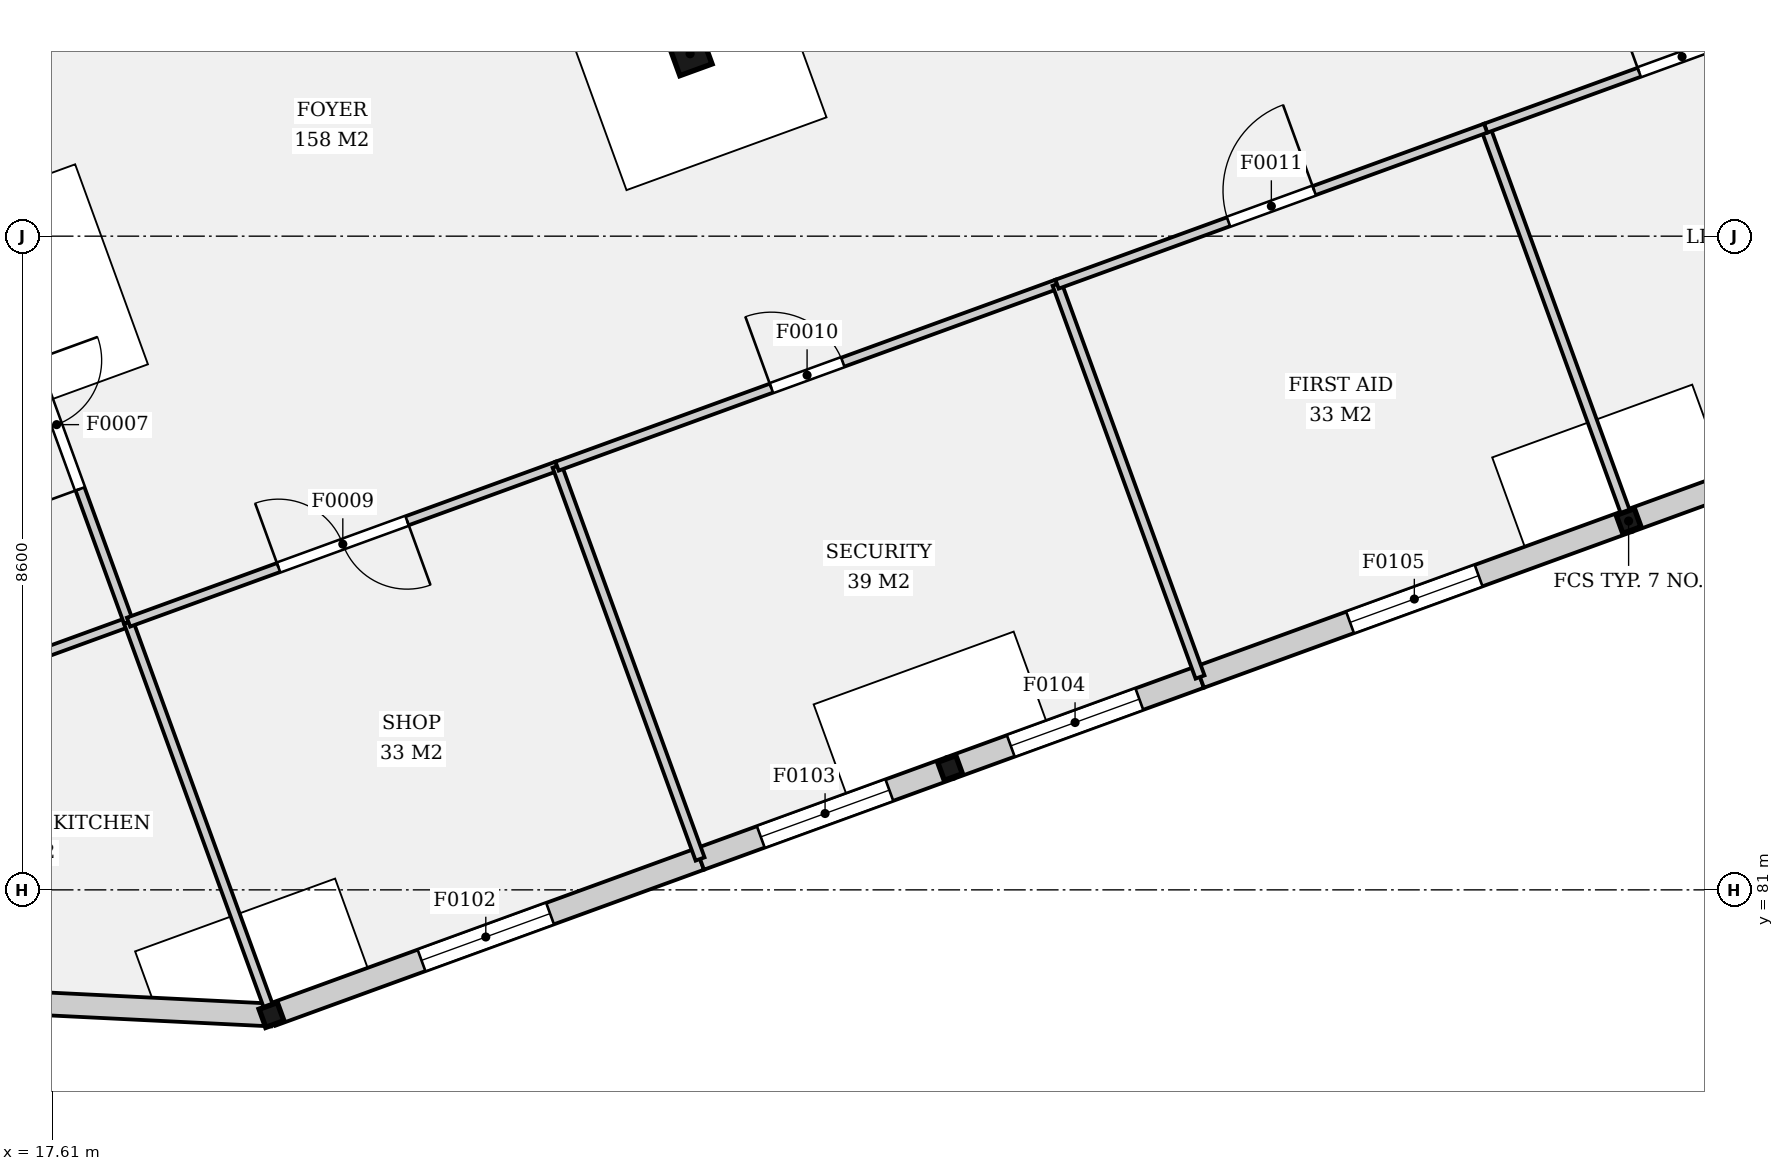
"""IFC4 building model, lengths in metres.
Left out: names, types, materials, properties, quantities, classifications, styles, units other than length and angle.
Written with IfcOpenShell. Run it as: python <this file> out.ifc"""

import sys

from ifc_helpers import new_model, si_unit, direction, frame, frame_2d, origin, origin_2d, place, context, subcontext, project, spatial, rectangle, hollow_rectangle, extrude, element, fill, save


model = new_model("IFC4")
c1 = context("Model", 3, precision=1e-05, world=origin(), true_north=direction((0.0, 1.0)))
c2 = subcontext(c1, "Body", "Model", "MODEL_VIEW")
j1 = project(units=[si_unit("LENGTHUNIT", "METRE"), si_unit("PLANEANGLEUNIT", "RADIAN")], contexts=[c1])
p1 = place(None, origin())
s1 = spatial("IfcSite", under=j1, at=p1, CompositionType="ELEMENT")
p2 = place(p1, origin())
s2 = spatial("IfcBuilding", under=s1, at=p2, CompositionType="ELEMENT")
p3 = place(p2, origin())
s3 = spatial("IfcBuildingStorey", under=s2, at=p3, CompositionType="ELEMENT", Elevation=0.0)
for number, where, z_axis, x_axis in (
    (1, (20.493, 79.354, 0.0), (0.0, 0.0, 1.0), (0.94, 0.342, 0.0)),
    (2, (29.42, 82.603, 0.0), (0.0, 0.0, 1.0), (0.94, 0.342, 0.0)),
    (3, (38.347, 85.852, 0.0), (0.0, 0.0, 1.0), (0.94, 0.342, 0.0)),
):
    element("IfcColumn", number, at=place(p3, frame(where, z_axis=z_axis, x_axis=x_axis)), inside=s3, PredefinedType="COLUMN", context=c2, shape_type="SweptSolid", body=[
        extrude(hollow_rectangle(XDim=0.254, YDim=0.254, WallThickness=0.012, at=origin_2d()), origin(), (0.0, 0.0, 1.0), 5.0),
    ])
p4 = place(p3, frame((26.0, 92.0, 0.0), z_axis=(0.0, 0.0, 1.0), x_axis=(0.939692620786, 0.342020143326, 0.0)))
e4 = element("IfcColumn", 4, at=p4, inside=s3, PredefinedType="COLUMN", context=c2, shape_type="SweptSolid", body=[
    extrude(rectangle(XDim=0.45, YDim=0.45, at=origin_2d()), origin(), (0.0, 0.0, 1.0), 5.0),
])
p5 = place(p3, frame((10.198, 79.864, 0.0), z_axis=(0.0, 0.0, 1.0), x_axis=(0.998777549242, -0.049430831779, 0.0)))
e5 = element("IfcWall", 5, at=p5, inside=s3, PredefinedType="ELEMENTEDWALL", context=c2, shape_type="SweptSolid", body=[
    extrude(rectangle(XDim=10.308, YDim=0.3, at=frame_2d((5.154, 0.0))), origin(), (0.0, 0.0, 1.0), 4.303),
])
p6 = place(p5, frame((4.254, 0.0, 0.9)))
e6 = element("IfcOpeningElement", 6, at=p6, cuts=e5, PredefinedType="OPENING", context=c2, shape_type="SweptSolid", body=[
    extrude(rectangle(XDim=1.8, YDim=2.4, at=frame_2d((0.9, 1.2))), frame((0.0, 0.16, 0.0), z_axis=(0.0, -1.0, 0.0), x_axis=(1.0, 0.0, 0.0)), (0.0, 0.0, 1.0), 0.32),
])
p7 = place(p3, frame((20.493, 79.354, 0.0), z_axis=(0.0, 0.0, 1.0), x_axis=(0.939699533273, 0.342001150825, 0.0)))
e7 = element("IfcWall", 7, at=p7, inside=s3, PredefinedType="ELEMENTEDWALL", context=c2, shape_type="SweptSolid", body=[
    extrude(rectangle(XDim=6.0, YDim=0.3, at=frame_2d((3.0, 0.0))), origin(), (0.0, 0.0, 1.0), 4.303),
])
p8 = place(p7, frame((2.1, 0.0, 0.9)))
e8 = element("IfcOpeningElement", 8, at=p8, cuts=e7, PredefinedType="OPENING", context=c2, shape_type="SweptSolid", body=[
    extrude(rectangle(XDim=1.8, YDim=2.4, at=frame_2d((0.9, 1.2))), frame((0.0, 0.16, 0.0), z_axis=(0.0, -1.0, 0.0), x_axis=(1.0, 0.0, 0.0)), (0.0, 0.0, 1.0), 0.32),
])
p9 = place(p3, frame((26.131, 81.406, 0.0), z_axis=(0.0, 0.0, 1.0), x_axis=(0.939693585395, 0.342017493073, 0.0)))
e9 = element("IfcWall", 9, at=p9, inside=s3, PredefinedType="ELEMENTEDWALL", context=c2, shape_type="SweptSolid", body=[
    extrude(rectangle(XDim=3.5, YDim=0.3, at=frame_2d((1.75, 0.0))), origin(), (0.0, 0.0, 1.0), 4.303),
])
p10 = place(p9, frame((0.85, 0.0, 0.9)))
e10 = element("IfcOpeningElement", 10, at=p10, cuts=e9, PredefinedType="OPENING", context=c2, shape_type="SweptSolid", body=[
    extrude(rectangle(XDim=1.8, YDim=2.4, at=frame_2d((0.9, 1.2))), frame((0.0, 0.16, 0.0), z_axis=(0.0, -1.0, 0.0), x_axis=(1.0, 0.0, 0.0)), (0.0, 0.0, 1.0), 0.32),
])
p11 = place(p3, frame((29.42, 82.603, 0.0), z_axis=(0.0, 0.0, 1.0), x_axis=(0.939693585395, 0.342017493073, 0.0)))
e11 = element("IfcWall", 11, at=p11, inside=s3, PredefinedType="ELEMENTEDWALL", context=c2, shape_type="SweptSolid", body=[
    extrude(rectangle(XDim=3.5, YDim=0.3, at=frame_2d((1.75, 0.0))), origin(), (0.0, 0.0, 1.0), 4.303),
])
p12 = place(p11, frame((0.85, 0.0, 0.9)))
e12 = element("IfcOpeningElement", 12, at=p12, cuts=e11, PredefinedType="OPENING", context=c2, shape_type="SweptSolid", body=[
    extrude(rectangle(XDim=1.8, YDim=2.4, at=frame_2d((0.9, 1.2))), frame((0.0, 0.16, 0.0), z_axis=(0.0, -1.0, 0.0), x_axis=(1.0, 0.0, 0.0)), (0.0, 0.0, 1.0), 0.32),
])
p13 = place(p3, frame((32.709, 83.8, 0.0), z_axis=(0.0, 0.0, 1.0), x_axis=(0.939691215801, 0.342024003465, 0.0)))
e13 = element("IfcWall", 13, at=p13, inside=s3, PredefinedType="ELEMENTEDWALL", context=c2, shape_type="SweptSolid", body=[
    extrude(rectangle(XDim=6.0, YDim=0.3, at=frame_2d((3.0, 0.0))), origin(), (0.0, 0.0, 1.0), 4.303),
])
p14 = place(p13, frame((2.1, 0.0, 0.9)))
e14 = element("IfcOpeningElement", 14, at=p14, cuts=e13, PredefinedType="OPENING", context=c2, shape_type="SweptSolid", body=[
    extrude(rectangle(XDim=1.8, YDim=2.4, at=frame_2d((0.9, 1.2))), frame((0.0, 0.16, 0.0), z_axis=(0.0, -1.0, 0.0), x_axis=(1.0, 0.0, 0.0)), (0.0, 0.0, 1.0), 0.32),
])
p15 = place(p3, frame((38.347, 85.852, 0.0), z_axis=(0.0, 0.0, 1.0), x_axis=(0.939690992795, 0.34202461616, 0.0)))
e15 = element("IfcWall", 15, at=p15, inside=s3, PredefinedType="ELEMENTEDWALL", context=c2, shape_type="SweptSolid", body=[
    extrude(rectangle(XDim=5.5, YDim=0.3, at=frame_2d((2.75, 0.0))), origin(), (0.0, 0.0, 1.0), 4.303),
])
p16 = place(p15, frame((1.85, 0.0, 0.0)))
e16 = element("IfcOpeningElement", 16, at=p16, cuts=e15, PredefinedType="OPENING", context=c2, shape_type="SweptSolid", body=[
    extrude(rectangle(XDim=1.8, YDim=2.1, at=frame_2d((0.9, 1.05))), frame((0.0, 0.16, 0.0), z_axis=(0.0, -1.0, 0.0), x_axis=(1.0, 0.0, 0.0)), (0.0, 0.0, 1.0), 0.32),
])
p17 = place(p3, frame((38.347, 85.852, 0.0), z_axis=(0.0, 0.0, 1.0), x_axis=(-0.34202461616, 0.939690992795, 0.0)))
e17 = element("IfcWall", 17, at=p17, inside=s3, PredefinedType="PARTITIONING", context=c2, shape_type="SweptSolid", body=[
    extrude(rectangle(XDim=5.5, YDim=0.125, at=frame_2d((2.75, 0.0))), origin(), (0.0, 0.0, 1.0), 4.187),
])
p18 = place(p3, frame((36.466, 91.021, 0.0), z_axis=(0.0, 0.0, 1.0), x_axis=(0.939690992795, 0.34202461616, 0.0)))
e18 = element("IfcWall", 18, at=p18, inside=s3, PredefinedType="PARTITIONING", context=c2, shape_type="SweptSolid", body=[
    extrude(rectangle(XDim=5.5, YDim=0.125, at=frame_2d((2.75, 0.0))), origin(), (0.0, 0.0, 1.0), 4.187),
])
p19 = place(p18, frame((2.15, 0.0, 0.0)))
e19 = element("IfcOpeningElement", 19, at=p19, cuts=e18, PredefinedType="OPENING", context=c2, shape_type="SweptSolid", body=[
    extrude(rectangle(XDim=1.2, YDim=2.1, at=frame_2d((0.6, 1.05))), frame((0.0, 0.073, 0.0), z_axis=(0.0, -1.0, 0.0), x_axis=(1.0, 0.0, 0.0)), (0.0, 0.0, 1.0), 0.145),
])
p20 = place(p3, frame((9.685, 81.273, 0.0), z_axis=(0.0, 0.0, 1.0), x_axis=(0.939692088769, 0.342021605027, 0.0)))
e20 = element("IfcWall", 20, at=p20, inside=s3, PredefinedType="PARTITIONING", context=c2, shape_type="SweptSolid", body=[
    extrude(rectangle(XDim=9.5, YDim=0.125, at=frame_2d((4.75, 0.0))), origin(), (0.0, 0.0, 1.0), 4.187),
])
p21 = place(p20, frame((4.3, 0.0, 0.0)))
e21 = element("IfcOpeningElement", 21, at=p21, cuts=e20, PredefinedType="OPENING", context=c2, shape_type="SweptSolid", body=[
    extrude(rectangle(XDim=0.9, YDim=2.1, at=frame_2d((0.45, 1.05))), frame((0.0, 0.073, 0.0), z_axis=(0.0, -1.0, 0.0), x_axis=(1.0, 0.0, 0.0)), (0.0, 0.0, 1.0), 0.145),
])
p22 = place(p3, frame((20.493, 79.354, 0.0), z_axis=(0.0, 0.0, 1.0), x_axis=(-0.34202461616, 0.939690992795, 0.0)))
e22 = element("IfcWall", 22, at=p22, inside=s3, PredefinedType="PARTITIONING", context=c2, shape_type="SweptSolid", body=[
    extrude(rectangle(XDim=5.5, YDim=0.125, at=frame_2d((2.75, 0.0))), origin(), (0.0, 0.0, 1.0), 4.187),
])
p23 = place(p3, frame((18.612, 84.522, 0.0), z_axis=(0.0, 0.0, 1.0), x_axis=(-0.342013514495, 0.939695033456, 0.0)))
e23 = element("IfcWall", 23, at=p23, inside=s3, PredefinedType="PARTITIONING", context=c2, shape_type="SweptSolid", body=[
    extrude(rectangle(XDim=7.9, YDim=0.125, at=frame_2d((3.95, 0.0))), origin(), (0.0, 0.0, 1.0), 4.187),
])
p24 = place(p23, frame((1.865, 0.0, 0.0)))
e24 = element("IfcOpeningElement", 24, at=p24, cuts=e23, PredefinedType="OPENING", context=c2, shape_type="SweptSolid", body=[
    extrude(rectangle(XDim=1.8, YDim=2.1, at=frame_2d((0.9, 1.05))), frame((0.0, 0.073, 0.0), z_axis=(0.0, -1.0, 0.0), x_axis=(1.0, 0.0, 0.0)), (0.0, 0.0, 1.0), 0.145),
])
p25 = place(p3, frame((18.612, 84.522, 0.0), z_axis=(0.0, 0.0, 1.0), x_axis=(0.939699533273, 0.342001150825, 0.0)))
e25 = element("IfcWall", 25, at=p25, inside=s3, PredefinedType="PARTITIONING", context=c2, shape_type="SweptSolid", body=[
    extrude(rectangle(XDim=6.0, YDim=0.125, at=frame_2d((3.0, 0.0))), origin(), (0.0, 0.0, 1.0), 4.187),
])
p26 = place(p25, frame((2.1, 0.0, 0.0)))
e26 = element("IfcOpeningElement", 26, at=p26, cuts=e25, PredefinedType="OPENING", context=c2, shape_type="SweptSolid", body=[
    extrude(rectangle(XDim=1.8, YDim=2.1, at=frame_2d((0.9, 1.05))), frame((0.0, 0.073, 0.0), z_axis=(0.0, -1.0, 0.0), x_axis=(1.0, 0.0, 0.0)), (0.0, 0.0, 1.0), 0.145),
])
p27 = place(p3, frame((26.131, 81.406, 0.0), z_axis=(0.0, 0.0, 1.0), x_axis=(-0.34202461616, 0.939690992795, 0.0)))
e27 = element("IfcWall", 27, at=p27, inside=s3, PredefinedType="PARTITIONING", context=c2, shape_type="SweptSolid", body=[
    extrude(rectangle(XDim=5.5, YDim=0.125, at=frame_2d((2.75, 0.0))), origin(), (0.0, 0.0, 1.0), 4.303),
])
p28 = place(p3, frame((24.25, 86.574, 0.0), z_axis=(0.0, 0.0, 1.0), x_axis=(0.939682375401, 0.342048290979, 0.0)))
e28 = element("IfcWall", 28, at=p28, inside=s3, PredefinedType="PARTITIONING", context=c2, shape_type="SweptSolid", body=[
    extrude(rectangle(XDim=7.0, YDim=0.125, at=frame_2d((3.5, 0.0))), origin(), (0.0, 0.0, 1.0), 4.187),
])
p29 = place(p28, frame((3.0, 0.0, 0.0)))
e29 = element("IfcOpeningElement", 29, at=p29, cuts=e28, PredefinedType="OPENING", context=c2, shape_type="SweptSolid", body=[
    extrude(rectangle(XDim=1.0, YDim=2.1, at=frame_2d((0.5, 1.05))), frame((0.0, 0.073, 0.0), z_axis=(0.0, -1.0, 0.0), x_axis=(1.0, 0.0, 0.0)), (0.0, 0.0, 1.0), 0.145),
])
p30 = place(p3, frame((32.709, 83.8, 0.0), z_axis=(0.0, 0.0, 1.0), x_axis=(-0.342010349897, 0.939696185245, 0.0)))
e30 = element("IfcWall", 30, at=p30, inside=s3, PredefinedType="PARTITIONING", context=c2, shape_type="SweptSolid", body=[
    extrude(rectangle(XDim=5.5, YDim=0.125, at=frame_2d((2.75, 0.0))), origin(), (0.0, 0.0, 1.0), 4.303),
])
p31 = place(p3, frame((30.828, 88.969, 0.0), z_axis=(0.0, 0.0, 1.0), x_axis=(0.939704292321, 0.341988074343, 0.0)))
e31 = element("IfcWall", 31, at=p31, inside=s3, PredefinedType="PARTITIONING", context=c2, shape_type="SweptSolid", body=[
    extrude(rectangle(XDim=6.0, YDim=0.125, at=frame_2d((3.0, 0.0))), origin(), (0.0, 0.0, 1.0), 4.187),
])
p32 = place(p31, frame((2.4, 0.0, 0.0)))
e32 = element("IfcOpeningElement", 32, at=p32, cuts=e31, PredefinedType="OPENING", context=c2, shape_type="SweptSolid", body=[
    extrude(rectangle(XDim=1.2, YDim=2.1, at=frame_2d((0.6, 1.05))), frame((0.0, 0.073, 0.0), z_axis=(0.0, -1.0, 0.0), x_axis=(1.0, 0.0, 0.0)), (0.0, 0.0, 1.0), 0.145),
])
p33 = place(p8, origin())
e33 = element("IfcWindow", 33, at=p33, inside=s3, PartitioningType="SINGLE_PANEL", PredefinedType="WINDOW", context=c2, shape_type="SweptSolid", body=[
    extrude(rectangle(XDim=1.8, YDim=2.4, at=frame_2d((0.9, 1.2))), frame((0.0, 0.03, 0.0), z_axis=(0.0, -1.0, 0.0), x_axis=(1.0, 0.0, 0.0)), (0.0, 0.0, 1.0), 0.06),
])
fill(e8, e33)
p34 = place(p10, origin())
e34 = element("IfcWindow", 34, at=p34, inside=s3, PartitioningType="SINGLE_PANEL", PredefinedType="WINDOW", context=c2, shape_type="SweptSolid", body=[
    extrude(rectangle(XDim=1.8, YDim=2.4, at=frame_2d((0.9, 1.2))), frame((0.0, 0.03, 0.0), z_axis=(0.0, -1.0, 0.0), x_axis=(1.0, 0.0, 0.0)), (0.0, 0.0, 1.0), 0.06),
])
fill(e10, e34)
p35 = place(p12, origin())
e35 = element("IfcWindow", 35, at=p35, inside=s3, PartitioningType="SINGLE_PANEL", PredefinedType="WINDOW", context=c2, shape_type="SweptSolid", body=[
    extrude(rectangle(XDim=1.8, YDim=2.4, at=frame_2d((0.9, 1.2))), frame((0.0, 0.03, 0.0), z_axis=(0.0, -1.0, 0.0), x_axis=(1.0, 0.0, 0.0)), (0.0, 0.0, 1.0), 0.06),
])
fill(e12, e35)
p36 = place(p14, origin())
e36 = element("IfcWindow", 36, at=p36, inside=s3, PartitioningType="SINGLE_PANEL", PredefinedType="WINDOW", context=c2, shape_type="SweptSolid", body=[
    extrude(rectangle(XDim=1.8, YDim=2.4, at=frame_2d((0.9, 1.2))), frame((0.0, 0.03, 0.0), z_axis=(0.0, -1.0, 0.0), x_axis=(1.0, 0.0, 0.0)), (0.0, 0.0, 1.0), 0.06),
])
fill(e14, e36)
p37 = place(p24, origin())
e37 = element("IfcDoor", 37, at=p37, inside=s3, OperationType="DOUBLE_DOOR_SINGLE_SWING", PredefinedType="DOOR", context=c2, shape_type="SweptSolid", body=[
    extrude(rectangle(XDim=1.8, YDim=2.1, at=frame_2d((0.9, 1.05))), frame((0.0, 0.025, 0.0), z_axis=(0.0, -1.0, 0.0), x_axis=(1.0, 0.0, 0.0)), (0.0, 0.0, 1.0), 0.05),
])
fill(e24, e37)
p38 = place(p26, origin())
e38 = element("IfcDoor", 38, at=p38, inside=s3, OperationType="DOUBLE_DOOR_SINGLE_SWING", PredefinedType="DOOR", context=c2, shape_type="SweptSolid", body=[
    extrude(rectangle(XDim=1.8, YDim=2.1, at=frame_2d((0.9, 1.05))), frame((0.0, 0.025, 0.0), z_axis=(0.0, -1.0, 0.0), x_axis=(1.0, 0.0, 0.0)), (0.0, 0.0, 1.0), 0.05),
])
fill(e26, e38)
p39 = place(p29, origin())
e39 = element("IfcDoor", 39, at=p39, inside=s3, OperationType="SINGLE_SWING_LEFT", PredefinedType="DOOR", context=c2, shape_type="SweptSolid", body=[
    extrude(rectangle(XDim=1.0, YDim=2.1, at=frame_2d((0.5, 1.05))), frame((0.0, 0.025, 0.0), z_axis=(0.0, -1.0, 0.0), x_axis=(1.0, 0.0, 0.0)), (0.0, 0.0, 1.0), 0.05),
])
fill(e29, e39)
p40 = place(p32, origin())
e40 = element("IfcDoor", 40, at=p40, inside=s3, OperationType="SINGLE_SWING_RIGHT", PredefinedType="DOOR", context=c2, shape_type="SweptSolid", body=[
    extrude(rectangle(XDim=1.2, YDim=2.1, at=frame_2d((0.6, 1.05))), frame((0.0, 0.025, 0.0), z_axis=(0.0, -1.0, 0.0), x_axis=(1.0, 0.0, 0.0)), (0.0, 0.0, 1.0), 0.05),
])
fill(e32, e40)
p41 = place(p19, origin())
e41 = element("IfcDoor", 41, at=p41, inside=s3, OperationType="SINGLE_SWING_LEFT", PredefinedType="DOOR", context=c2, shape_type="SweptSolid", body=[
    extrude(rectangle(XDim=1.2, YDim=2.1, at=frame_2d((0.6, 1.05))), frame((0.0, 0.025, 0.0), z_axis=(0.0, -1.0, 0.0), x_axis=(1.0, 0.0, 0.0)), (0.0, 0.0, 1.0), 0.05),
])
fill(e19, e41)
save(model, sys.argv[1])
